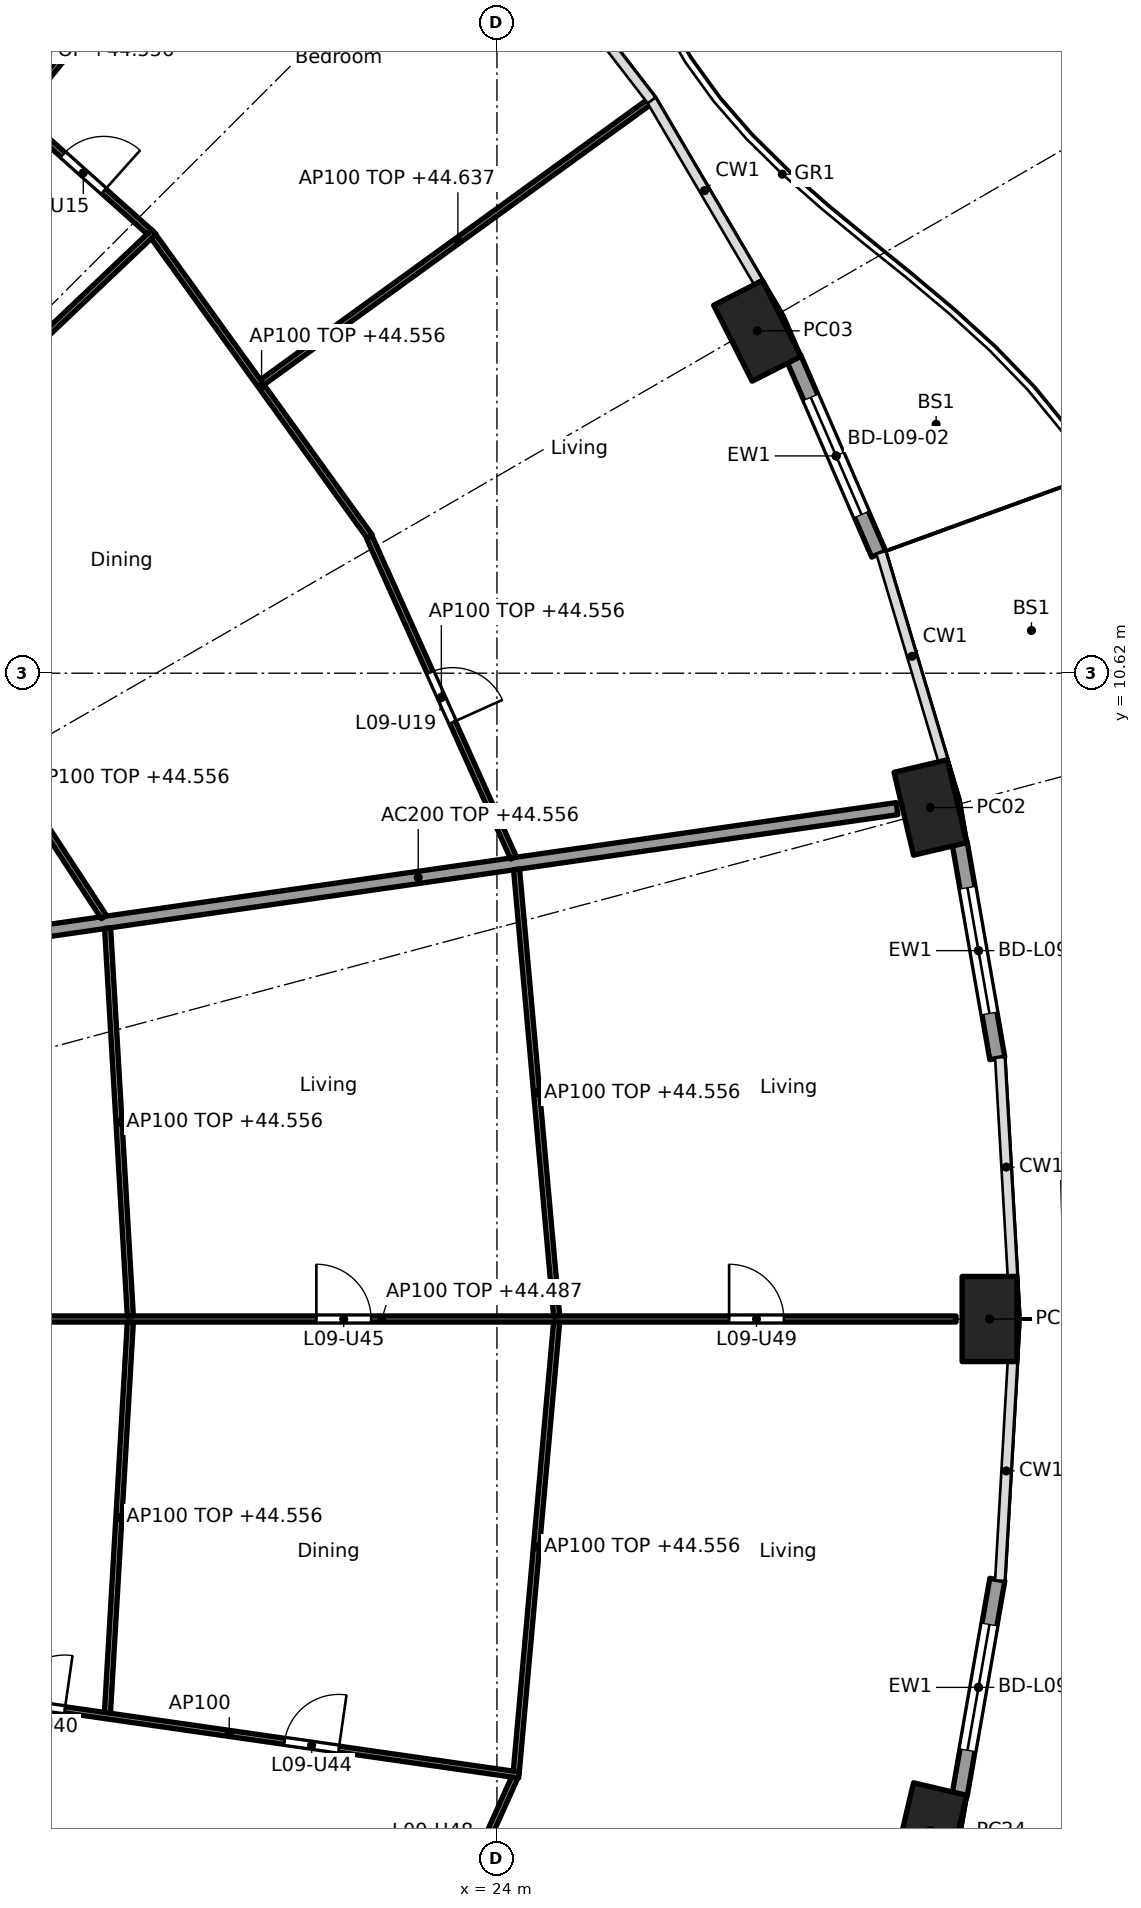
"""IFC4 building model, lengths in metres.
Left out: names, types, materials, properties, quantities, classifications, styles, units other than length and angle.
Written with IfcOpenShell. Run it as: python <this file> out.ifc"""

import sys

from ifc_helpers import new_model, si_unit, direction, frame, frame_2d, origin, origin_2d, place, context, subcontext, project, spatial, rectangle, hollow_rectangle, extrude, element, fill, save


model = new_model("IFC4")
c1 = context("Model", 3, precision=1e-05, world=origin(), true_north=direction((0.0, 1.0)))
c2 = subcontext(c1, "Body", "Model", "MODEL_VIEW")
j1 = project(units=[si_unit("LENGTHUNIT", "METRE"), si_unit("PLANEANGLEUNIT", "RADIAN")], contexts=[c1])
p1 = place(None, origin())
s1 = spatial("IfcSite", under=j1, at=p1, CompositionType="ELEMENT")
p2 = place(p1, origin())
s2 = spatial("IfcBuilding", under=s1, at=p2, CompositionType="ELEMENT")
p3 = place(p2, frame((0.0, 0.0, 41.8)))
s3 = spatial("IfcBuildingStorey", under=s2, at=p3, CompositionType="ELEMENT", Elevation=41.8)
for number, where, z_axis, x_axis in (
    (1, (32.1, 0.0, 0.0), (0.0, 0.0, 1.0), (0.0, 1.0, 0.0)),
    (2, (31.129, 8.412, 0.0), (0.0, 0.0, 1.0), (-0.229, 0.973, 0.0)),
    (3, (28.282, 16.25, 0.0), (0.0, 0.0, 1.0), (-0.452, 0.892, 0.0)),
    (4, (31.129, -8.412, 0.0), (0.0, 0.0, 1.0), (0.229, 0.973, 0.0)),
):
    element("IfcColumn", number, at=place(p3, frame(where, z_axis=z_axis, x_axis=x_axis)), inside=s3, PredefinedType="COLUMN", context=c2, shape_type="SweptSolid", body=[
        extrude(hollow_rectangle(XDim=1.4, YDim=0.9, WallThickness=0.05, at=origin_2d()), origin(), (0.0, 0.0, 1.0), 3.7),
    ])
p4 = place(p3, frame((31.609, 7.83, 0.0), z_axis=(0.0, 0.0, 1.0), x_axis=(0.172217377323, -0.98505897029, 0.0)))
e5 = element("IfcWall", 5, at=p4, inside=s3, PredefinedType="SOLIDWALL", context=c2, shape_type="SweptSolid", body=[
    extrude(rectangle(XDim=3.598, YDim=0.25, at=frame_2d((1.799, 0.0))), origin(), (0.0, 0.0, 1.0), 3.44),
])
p5 = place(p4, frame((0.749, 0.0, 0.0)))
e6 = element("IfcOpeningElement", 6, at=p5, cuts=e5, PredefinedType="OPENING", context=c2, shape_type="SweptSolid", body=[
    extrude(rectangle(XDim=2.1, YDim=2.4, at=frame_2d((1.05, 1.2))), frame((0.0, 0.135, 0.0), z_axis=(0.0, -1.0, 0.0), x_axis=(1.0, 0.0, 0.0)), (0.0, 0.0, 1.0), 0.27),
])
p6 = place(p3, frame((28.878, 15.808, 0.0), z_axis=(0.0, 0.0, 1.0), x_axis=(0.397624958345, -0.917548032803, 0.0)))
e7 = element("IfcWall", 7, at=p6, inside=s3, PredefinedType="SOLIDWALL", context=c2, shape_type="SweptSolid", body=[
    extrude(rectangle(XDim=3.52, YDim=0.25, at=frame_2d((1.76, 0.0))), origin(), (0.0, 0.0, 1.0), 3.44),
])
p7 = place(p6, frame((0.71, 0.0, 0.0)))
e8 = element("IfcOpeningElement", 8, at=p7, cuts=e7, PredefinedType="OPENING", context=c2, shape_type="SweptSolid", body=[
    extrude(rectangle(XDim=2.1, YDim=2.4, at=frame_2d((1.05, 1.2))), frame((0.0, 0.135, 0.0), z_axis=(0.0, -1.0, 0.0), x_axis=(1.0, 0.0, 0.0)), (0.0, 0.0, 1.0), 0.27),
])
p8 = place(p3, frame((32.229, -4.286, 0.0), z_axis=(0.0, 0.0, 1.0), x_axis=(-0.172217377323, -0.98505897029, 0.0)))
e9 = element("IfcWall", 9, at=p8, inside=s3, PredefinedType="SOLIDWALL", context=c2, shape_type="SweptSolid", body=[
    extrude(rectangle(XDim=3.598, YDim=0.25, at=frame_2d((1.799, 0.0))), origin(), (0.0, 0.0, 1.0), 3.44),
])
p9 = place(p8, frame((0.749, 0.0, 0.0)))
e10 = element("IfcOpeningElement", 10, at=p9, cuts=e9, PredefinedType="OPENING", context=c2, shape_type="SweptSolid", body=[
    extrude(rectangle(XDim=2.1, YDim=2.4, at=frame_2d((1.05, 1.2))), frame((0.0, 0.135, 0.0), z_axis=(0.0, -1.0, 0.0), x_axis=(1.0, 0.0, 0.0)), (0.0, 0.0, 1.0), 0.27),
])
p10 = place(p3, frame((14.832, 6.13, 0.0), z_axis=(0.0, 0.0, 1.0), x_axis=(0.989836541293, 0.142209779978, 0.0)))
e11 = element("IfcWall", 11, at=p10, inside=s3, PredefinedType="PARTITIONING", context=c2, shape_type="SweptSolid", body=[
    extrude(rectangle(XDim=15.909, YDim=0.2, at=frame_2d((7.955, 0.0))), origin(), (0.0, 0.0, 1.0), 2.756),
])
p11 = place(p3, frame((12.665, 0.0, 0.0), z_axis=(0.0, 0.0, 1.0), x_axis=(1.0, 0.0, 0.0)))
e12 = element("IfcWall", 12, at=p11, inside=s3, PredefinedType="PARTITIONING", context=c2, shape_type="SweptSolid", body=[
    extrude(rectangle(XDim=18.885, YDim=0.1, at=frame_2d((9.443, 0.0))), origin(), (0.0, 0.0, 1.0), 2.687),
])
p12 = place(p11, frame((2.205, 0.0, 0.0)))
e13 = element("IfcOpeningElement", 13, at=p12, cuts=e12, PredefinedType="OPENING", context=c2, shape_type="SweptSolid", body=[
    extrude(rectangle(XDim=0.9, YDim=2.1, at=frame_2d((0.45, 1.05))), frame((0.0, 0.06, 0.0), z_axis=(0.0, -1.0, 0.0), x_axis=(1.0, 0.0, 0.0)), (0.0, 0.0, 1.0), 0.12),
])
p13 = place(p11, frame((8.366, 0.0, 0.0)))
e14 = element("IfcOpeningElement", 14, at=p13, cuts=e12, PredefinedType="OPENING", context=c2, shape_type="SweptSolid", body=[
    extrude(rectangle(XDim=0.9, YDim=2.1, at=frame_2d((0.45, 1.05))), frame((0.0, 0.06, 0.0), z_axis=(0.0, -1.0, 0.0), x_axis=(1.0, 0.0, 0.0)), (0.0, 0.0, 1.0), 0.12),
])
p14 = place(p11, frame((15.154, 0.0, 0.0)))
e15 = element("IfcOpeningElement", 15, at=p14, cuts=e12, PredefinedType="OPENING", context=c2, shape_type="SweptSolid", body=[
    extrude(rectangle(XDim=0.9, YDim=2.1, at=frame_2d((0.45, 1.05))), frame((0.0, 0.06, 0.0), z_axis=(0.0, -1.0, 0.0), x_axis=(1.0, 0.0, 0.0)), (0.0, 0.0, 1.0), 0.12),
])
p15 = place(p3, frame((17.971, 0.05, 0.0), z_axis=(0.0, 0.0, 1.0), x_axis=(-0.058513659907, 0.998286607946, 0.0)))
e16 = element("IfcWall", 16, at=p15, inside=s3, PredefinedType="PARTITIONING", context=c2, shape_type="SweptSolid", body=[
    extrude(rectangle(XDim=6.388, YDim=0.1, at=frame_2d((3.194, 0.0))), origin(), (0.0, 0.0, 1.0), 2.756),
])
p16 = place(p3, frame((17.971, -0.05, 0.0), z_axis=(0.0, 0.0, 1.0), x_axis=(-0.058475267553, -0.998288857538, 0.0)))
e17 = element("IfcWall", 17, at=p16, inside=s3, PredefinedType="PARTITIONING", context=c2, shape_type="SweptSolid", body=[
    extrude(rectangle(XDim=6.438, YDim=0.1, at=frame_2d((3.219, 0.0))), origin(), (0.0, 0.0, 1.0), 2.756),
])
p17 = place(p3, frame((24.982, 0.05, 0.0), z_axis=(0.0, 0.0, 1.0), x_axis=(-0.08944290521, 0.995991951126, 0.0)))
e18 = element("IfcWall", 18, at=p17, inside=s3, PredefinedType="PARTITIONING", context=c2, shape_type="SweptSolid", body=[
    extrude(rectangle(XDim=7.373, YDim=0.1, at=frame_2d((3.686, 0.0))), origin(), (0.0, 0.0, 1.0), 2.756),
])
p18 = place(p3, frame((24.982, -0.05, 0.0), z_axis=(0.0, 0.0, 1.0), x_axis=(-0.089432471274, -0.995992888068, 0.0)))
e19 = element("IfcWall", 19, at=p18, inside=s3, PredefinedType="PARTITIONING", context=c2, shape_type="SweptSolid", body=[
    extrude(rectangle(XDim=7.423, YDim=0.1, at=frame_2d((3.711, 0.0))), origin(), (0.0, 0.0, 1.0), 2.756),
])
p19 = place(p3, frame((17.537, 6.61, 0.0), z_axis=(0.0, 0.0, 1.0), x_axis=(-0.547637987196, 0.836715384692, 0.0)))
e20 = element("IfcWall", 20, at=p19, inside=s3, PredefinedType="PARTITIONING", context=c2, shape_type="SweptSolid", body=[
    extrude(rectangle(XDim=3.52, YDim=0.1, at=frame_2d((1.76, 0.0))), origin(), (0.0, 0.0, 1.0), 2.756),
])
p20 = place(p3, frame((24.273, 7.584, 0.0), z_axis=(0.0, 0.0, 1.0), x_axis=(-0.410201529109, 0.911994904326, 0.0)))
e21 = element("IfcWall", 21, at=p20, inside=s3, PredefinedType="PARTITIONING", context=c2, shape_type="SweptSolid", body=[
    extrude(rectangle(XDim=5.787, YDim=0.1, at=frame_2d((2.894, 0.0))), origin(), (0.0, 0.0, 1.0), 2.756),
])
p21 = place(p20, frame((2.444, 0.0, 0.0)))
e22 = element("IfcOpeningElement", 22, at=p21, cuts=e21, PredefinedType="OPENING", context=c2, shape_type="SweptSolid", body=[
    extrude(rectangle(XDim=0.9, YDim=2.1, at=frame_2d((0.45, 1.05))), frame((0.0, 0.06, 0.0), z_axis=(0.0, -1.0, 0.0), x_axis=(1.0, 0.0, 0.0)), (0.0, 0.0, 1.0), 0.12),
])
p22 = place(p3, frame((21.908, 12.866, 0.0), z_axis=(0.0, 0.0, 1.0), x_axis=(-0.584558392935, 0.811351640936, 0.0)))
e23 = element("IfcWall", 23, at=p22, inside=s3, PredefinedType="PARTITIONING", context=c2, shape_type="SweptSolid", body=[
    extrude(rectangle(XDim=6.084, YDim=0.1, at=frame_2d((3.042, 0.0))), origin(), (0.0, 0.0, 1.0), 2.756),
])
p23 = place(p3, frame((20.141, 15.405, 0.0), z_axis=(0.0, 0.0, 1.0), x_axis=(0.809834895779, 0.58665785734, 0.0)))
e24 = element("IfcWall", 24, at=p23, inside=s3, PredefinedType="PARTITIONING", context=c2, shape_type="SweptSolid", body=[
    extrude(rectangle(XDim=7.945, YDim=0.1, at=frame_2d((3.973, 0.0))), origin(), (0.0, 0.0, 1.0), 2.837),
])
p24 = place(p3, frame((8.957, 8.953, 0.0), z_axis=(0.0, 0.0, 1.0), x_axis=(0.725250022034, 0.688485588476, 0.0)))
e25 = element("IfcWall", 25, at=p24, inside=s3, PredefinedType="PARTITIONING", context=c2, shape_type="SweptSolid", body=[
    extrude(rectangle(XDim=12.963, YDim=0.1, at=frame_2d((6.481, 0.0))), origin(), (0.0, 0.0, 1.0), 2.687),
])
p25 = place(p24, frame((8.79, 0.0, 0.0)))
e26 = element("IfcOpeningElement", 26, at=p25, cuts=e25, PredefinedType="OPENING", context=c2, shape_type="SweptSolid", body=[
    extrude(rectangle(XDim=0.9, YDim=2.1, at=frame_2d((0.45, 1.05))), frame((0.0, 0.06, 0.0), z_axis=(0.0, -1.0, 0.0), x_axis=(1.0, 0.0, 0.0)), (0.0, 0.0, 1.0), 0.12),
])
p26 = place(p3, frame((18.285, 17.877, 0.0), z_axis=(0.0, 0.0, 1.0), x_axis=(-0.745812746724, 0.666155647596, 0.0)))
e27 = element("IfcWall", 27, at=p26, inside=s3, PredefinedType="PARTITIONING", context=c2, shape_type="SweptSolid", body=[
    extrude(rectangle(XDim=5.931, YDim=0.1, at=frame_2d((2.965, 0.0))), origin(), (0.0, 0.0, 1.0), 2.756),
])
p27 = place(p26, frame((1.008, 0.0, 0.0)))
e28 = element("IfcOpeningElement", 28, at=p27, cuts=e27, PredefinedType="OPENING", context=c2, shape_type="SweptSolid", body=[
    extrude(rectangle(XDim=0.9, YDim=2.1, at=frame_2d((0.45, 1.05))), frame((0.0, 0.06, 0.0), z_axis=(0.0, -1.0, 0.0), x_axis=(1.0, 0.0, 0.0)), (0.0, 0.0, 1.0), 0.12),
])
p28 = place(p3, frame((16.142, 19.858, 0.0), z_axis=(0.0, 0.0, 1.0), x_axis=(0.628738066508, 0.777617157555, 0.0)))
e29 = element("IfcWall", 29, at=p28, inside=s3, PredefinedType="PARTITIONING", context=c2, shape_type="SweptSolid", body=[
    extrude(rectangle(XDim=8.091, YDim=0.1, at=frame_2d((4.045, 0.0))), origin(), (0.0, 0.0, 1.0), 2.837),
])
p29 = place(p3, frame((10.813, -7.091, 0.0), z_axis=(0.0, 0.0, 1.0), x_axis=(0.885182649479, -0.465243674928, 0.0)))
e30 = element("IfcWall", 30, at=p29, inside=s3, PredefinedType="PARTITIONING", context=c2, shape_type="SweptSolid", body=[
    extrude(rectangle(XDim=12.551, YDim=0.1, at=frame_2d((6.275, 0.0))), origin(), (0.0, 0.0, 1.0), 2.687),
])
p30 = place(p29, frame((0.539, 0.0, 0.0)))
e31 = element("IfcOpeningElement", 31, at=p30, cuts=e30, PredefinedType="OPENING", context=c2, shape_type="SweptSolid", body=[
    extrude(rectangle(XDim=0.9, YDim=2.1, at=frame_2d((0.45, 1.05))), frame((0.0, 0.06, 0.0), z_axis=(0.0, -1.0, 0.0), x_axis=(1.0, 0.0, 0.0)), (0.0, 0.0, 1.0), 0.12),
])
p31 = place(p29, frame((8.494, 0.0, 0.0)))
e32 = element("IfcOpeningElement", 32, at=p31, cuts=e30, PredefinedType="OPENING", context=c2, shape_type="SweptSolid", body=[
    extrude(rectangle(XDim=0.9, YDim=2.1, at=frame_2d((0.45, 1.05))), frame((0.0, 0.06, 0.0), z_axis=(0.0, -1.0, 0.0), x_axis=(1.0, 0.0, 0.0)), (0.0, 0.0, 1.0), 0.12),
])
p32 = place(p3, frame((21.899, -12.861, 0.0), z_axis=(0.0, 0.0, 1.0), x_axis=(0.410197710154, 0.911996622025, 0.0)))
e33 = element("IfcWall", 33, at=p32, inside=s3, PredefinedType="PARTITIONING", context=c2, shape_type="SweptSolid", body=[
    extrude(rectangle(XDim=5.837, YDim=0.1, at=frame_2d((2.918, 0.0))), origin(), (0.0, 0.0, 1.0), 2.756),
])
p33 = place(p32, frame((3.928, 0.0, 0.0)))
e34 = element("IfcOpeningElement", 34, at=p33, cuts=e33, PredefinedType="OPENING", context=c2, shape_type="SweptSolid", body=[
    extrude(rectangle(XDim=0.9, YDim=2.1, at=frame_2d((0.45, 1.05))), frame((0.0, 0.06, 0.0), z_axis=(0.0, -1.0, 0.0), x_axis=(1.0, 0.0, 0.0)), (0.0, 0.0, 1.0), 0.12),
])
p34 = place(p3, frame((14.832, -6.13, 0.0), z_axis=(0.0, 0.0, 1.0), x_axis=(0.989837122016, -0.142205737856, 0.0)))
e35 = element("IfcWall", 35, at=p34, inside=s3, PredefinedType="PARTITIONING", context=c2, shape_type="SweptSolid", body=[
    extrude(rectangle(XDim=9.63, YDim=0.1, at=frame_2d((4.815, 0.0))), origin(), (0.0, 0.0, 1.0), 3.44),
])
p35 = place(p34, frame((1.182, 0.0, 0.0)))
e36 = element("IfcOpeningElement", 36, at=p35, cuts=e35, PredefinedType="OPENING", context=c2, shape_type="SweptSolid", body=[
    extrude(rectangle(XDim=0.9, YDim=2.1, at=frame_2d((0.45, 1.05))), frame((0.0, 0.06, 0.0), z_axis=(0.0, -1.0, 0.0), x_axis=(1.0, 0.0, 0.0)), (0.0, 0.0, 1.0), 0.12),
])
p36 = place(p34, frame((5.734, 0.0, 0.0)))
e37 = element("IfcOpeningElement", 37, at=p36, cuts=e35, PredefinedType="OPENING", context=c2, shape_type="SweptSolid", body=[
    extrude(rectangle(XDim=0.9, YDim=2.1, at=frame_2d((0.45, 1.05))), frame((0.0, 0.06, 0.0), z_axis=(0.0, -1.0, 0.0), x_axis=(1.0, 0.0, 0.0)), (0.0, 0.0, 1.0), 0.12),
])
p37 = place(p5, origin())
e38 = element("IfcDoor", 38, at=p37, inside=s3, OperationType="SLIDING_TO_LEFT", PredefinedType="DOOR", context=c2, shape_type="SweptSolid", body=[
    extrude(rectangle(XDim=2.1, YDim=2.4, at=frame_2d((1.05, 1.2))), frame((0.0, 0.025, 0.0), z_axis=(0.0, -1.0, 0.0), x_axis=(1.0, 0.0, 0.0)), (0.0, 0.0, 1.0), 0.05),
])
fill(e6, e38)
p38 = place(p7, origin())
e39 = element("IfcDoor", 39, at=p38, inside=s3, OperationType="SLIDING_TO_LEFT", PredefinedType="DOOR", context=c2, shape_type="SweptSolid", body=[
    extrude(rectangle(XDim=2.1, YDim=2.4, at=frame_2d((1.05, 1.2))), frame((0.0, 0.025, 0.0), z_axis=(0.0, -1.0, 0.0), x_axis=(1.0, 0.0, 0.0)), (0.0, 0.0, 1.0), 0.05),
])
fill(e8, e39)
p39 = place(p9, origin())
e40 = element("IfcDoor", 40, at=p39, inside=s3, OperationType="SLIDING_TO_LEFT", PredefinedType="DOOR", context=c2, shape_type="SweptSolid", body=[
    extrude(rectangle(XDim=2.1, YDim=2.4, at=frame_2d((1.05, 1.2))), frame((0.0, 0.025, 0.0), z_axis=(0.0, -1.0, 0.0), x_axis=(1.0, 0.0, 0.0)), (0.0, 0.0, 1.0), 0.05),
])
fill(e10, e40)
p40 = place(p27, frame((0.9, 0.0, 0.0), x_axis=(-1.0, 0.0, 0.0)))
e41 = element("IfcDoor", 41, at=p40, inside=s3, OperationType="SINGLE_SWING_RIGHT", PredefinedType="DOOR", context=c2, shape_type="SweptSolid", body=[
    extrude(rectangle(XDim=0.9, YDim=2.1, at=frame_2d((0.45, 1.05))), frame((0.0, 0.025, 0.0), z_axis=(0.0, -1.0, 0.0), x_axis=(1.0, 0.0, 0.0)), (0.0, 0.0, 1.0), 0.05),
])
fill(e28, e41)
p41 = place(p21, frame((0.9, 0.0, 0.0), x_axis=(-1.0, 0.0, 0.0)))
e42 = element("IfcDoor", 42, at=p41, inside=s3, OperationType="SINGLE_SWING_RIGHT", PredefinedType="DOOR", context=c2, shape_type="SweptSolid", body=[
    extrude(rectangle(XDim=0.9, YDim=2.1, at=frame_2d((0.45, 1.05))), frame((0.0, 0.025, 0.0), z_axis=(0.0, -1.0, 0.0), x_axis=(1.0, 0.0, 0.0)), (0.0, 0.0, 1.0), 0.05),
])
fill(e22, e42)
p42 = place(p35, origin())
e43 = element("IfcDoor", 43, at=p42, inside=s3, OperationType="SINGLE_SWING_RIGHT", PredefinedType="DOOR", context=c2, shape_type="SweptSolid", body=[
    extrude(rectangle(XDim=0.9, YDim=2.1, at=frame_2d((0.45, 1.05))), frame((0.0, 0.025, 0.0), z_axis=(0.0, -1.0, 0.0), x_axis=(1.0, 0.0, 0.0)), (0.0, 0.0, 1.0), 0.05),
])
fill(e36, e43)
p43 = place(p36, origin())
e44 = element("IfcDoor", 44, at=p43, inside=s3, OperationType="SINGLE_SWING_RIGHT", PredefinedType="DOOR", context=c2, shape_type="SweptSolid", body=[
    extrude(rectangle(XDim=0.9, YDim=2.1, at=frame_2d((0.45, 1.05))), frame((0.0, 0.025, 0.0), z_axis=(0.0, -1.0, 0.0), x_axis=(1.0, 0.0, 0.0)), (0.0, 0.0, 1.0), 0.05),
])
fill(e37, e44)
p44 = place(p13, origin())
e45 = element("IfcDoor", 45, at=p44, inside=s3, OperationType="SINGLE_SWING_LEFT", PredefinedType="DOOR", context=c2, shape_type="SweptSolid", body=[
    extrude(rectangle(XDim=0.9, YDim=2.1, at=frame_2d((0.45, 1.05))), frame((0.0, 0.025, 0.0), z_axis=(0.0, -1.0, 0.0), x_axis=(1.0, 0.0, 0.0)), (0.0, 0.0, 1.0), 0.05),
])
fill(e14, e45)
p45 = place(p14, origin())
e46 = element("IfcDoor", 46, at=p45, inside=s3, OperationType="SINGLE_SWING_LEFT", PredefinedType="DOOR", context=c2, shape_type="SweptSolid", body=[
    extrude(rectangle(XDim=0.9, YDim=2.1, at=frame_2d((0.45, 1.05))), frame((0.0, 0.025, 0.0), z_axis=(0.0, -1.0, 0.0), x_axis=(1.0, 0.0, 0.0)), (0.0, 0.0, 1.0), 0.05),
])
fill(e15, e46)
save(model, sys.argv[1])
